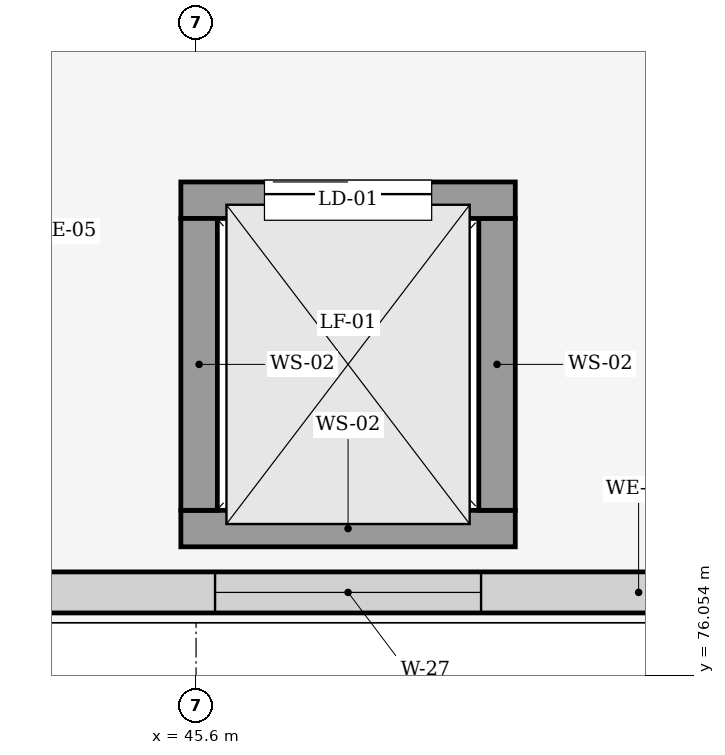
"""IFC4 building model, lengths in metres.
Left out: names, types, materials, properties, quantities, classifications, styles, units other than length and angle.
Written with IfcOpenShell. Run it as: python <this file> out.ifc"""

import sys

from ifc_helpers import new_model, si_unit, direction, frame, frame_2d, origin, place, context, subcontext, project, spatial, rectangle, extrude, element, fill, save


model = new_model("IFC4")
c1 = context("Model", 3, precision=1e-05, world=origin(), true_north=direction((0.0, 1.0)))
c2 = subcontext(c1, "Body", "Model", "MODEL_VIEW")
j1 = project(units=[si_unit("LENGTHUNIT", "METRE"), si_unit("PLANEANGLEUNIT", "RADIAN")], contexts=[c1])
p1 = place(None, origin())
s1 = spatial("IfcSite", under=j1, at=p1, CompositionType="ELEMENT")
p2 = place(p1, origin())
s2 = spatial("IfcBuilding", under=s1, at=p2, CompositionType="ELEMENT")
p3 = place(p2, frame((0.0, 0.0, 29.4)))
s3 = spatial("IfcBuildingStorey", under=s2, at=p3, CompositionType="ELEMENT", Elevation=29.4)
p4 = place(p3, frame((49.115, 76.6, 0.0), z_axis=(0.0, 0.0, 1.0), x_axis=(-1.0, 0.0, 0.0)))
e1 = element("IfcWall", 1, at=p4, inside=s3, PredefinedType="STANDARD", context=c2, shape_type="SweptSolid", body=[
    extrude(rectangle(XDim=5.03, YDim=0.27, at=frame_2d((2.515, 0.0))), origin(), (0.0, 0.0, 1.0), 4.425),
])
p5 = place(p4, frame((1.64, 0.0, 0.85)))
e2 = element("IfcOpeningElement", 2, at=p5, cuts=e1, PredefinedType="OPENING", context=c2, shape_type="SweptSolid", body=[
    extrude(rectangle(XDim=1.75, YDim=1.85, at=frame_2d((0.875, 0.925))), frame((0.0, 0.145, 0.0), z_axis=(0.0, -1.0, 0.0), x_axis=(1.0, 0.0, 0.0)), (0.0, 0.0, 1.0), 0.29),
])
p6 = place(p3, frame((47.7, 77.02, 0.0), z_axis=(0.0, 0.0, 1.0), x_axis=(-1.0, 0.0, 0.0)))
e3 = element("IfcWall", 3, at=p6, inside=s3, PredefinedType="SHEAR", context=c2, shape_type="SweptSolid", body=[
    extrude(rectangle(XDim=2.2, YDim=0.24, at=frame_2d((1.1, 0.0))), origin(), (0.0, 0.0, 1.0), 4.75),
])
p7 = place(p3, frame((47.58, 79.06, 0.0), z_axis=(0.0, 0.0, 1.0), x_axis=(0.0, -1.0, 0.0)))
e4 = element("IfcWall", 4, at=p7, inside=s3, PredefinedType="SHEAR", context=c2, shape_type="SweptSolid", body=[
    extrude(rectangle(XDim=1.92, YDim=0.24, at=frame_2d((0.96, 0.0))), origin(), (0.0, 0.0, 1.0), 4.75),
])
p8 = place(p3, frame((45.5, 79.18, 0.0), z_axis=(0.0, 0.0, 1.0), x_axis=(1.0, 0.0, 0.0)))
e5 = element("IfcWall", 5, at=p8, inside=s3, PredefinedType="SHEAR", context=c2, shape_type="SweptSolid", body=[
    extrude(rectangle(XDim=2.2, YDim=0.24, at=frame_2d((1.1, 0.0))), origin(), (0.0, 0.0, 1.0), 4.75),
])
p9 = place(p8, frame((0.55, 0.0, 0.0)))
e6 = element("IfcOpeningElement", 6, at=p9, cuts=e5, PredefinedType="OPENING", context=c2, shape_type="SweptSolid", body=[
    extrude(rectangle(XDim=1.1, YDim=2.15, at=frame_2d((0.55, 1.075))), frame((0.0, 0.13, 0.0), z_axis=(0.0, -1.0, 0.0), x_axis=(1.0, 0.0, 0.0)), (0.0, 0.0, 1.0), 0.26),
])
p10 = place(p3, frame((45.62, 77.14, 0.0), z_axis=(0.0, 0.0, 1.0), x_axis=(0.0, 1.0, 0.0)))
e7 = element("IfcWall", 7, at=p10, inside=s3, PredefinedType="SHEAR", context=c2, shape_type="SweptSolid", body=[
    extrude(rectangle(XDim=1.92, YDim=0.24, at=frame_2d((0.96, 0.0))), origin(), (0.0, 0.0, 1.0), 4.75),
])
p11 = place(p5, origin())
e8 = element("IfcWindow", 8, at=p11, inside=s3, PartitioningType="SINGLE_PANEL", PredefinedType="WINDOW", context=c2, shape_type="SweptSolid", body=[
    extrude(rectangle(XDim=1.75, YDim=1.85, at=frame_2d((0.875, 0.925))), frame((0.0, 0.03, 0.0), z_axis=(0.0, -1.0, 0.0), x_axis=(1.0, 0.0, 0.0)), (0.0, 0.0, 1.0), 0.06),
])
fill(e2, e8)
p12 = place(p9, origin())
e9 = element("IfcDoor", 9, at=p12, inside=s3, OperationType="SLIDING_TO_LEFT", PredefinedType="DOOR", context=c2, shape_type="SweptSolid", body=[
    extrude(rectangle(XDim=1.1, YDim=2.15, at=frame_2d((0.55, 1.075))), frame((0.0, 0.025, 0.0), z_axis=(0.0, -1.0, 0.0), x_axis=(1.0, 0.0, 0.0)), (0.0, 0.0, 1.0), 0.05),
])
fill(e6, e9)
save(model, sys.argv[1])
